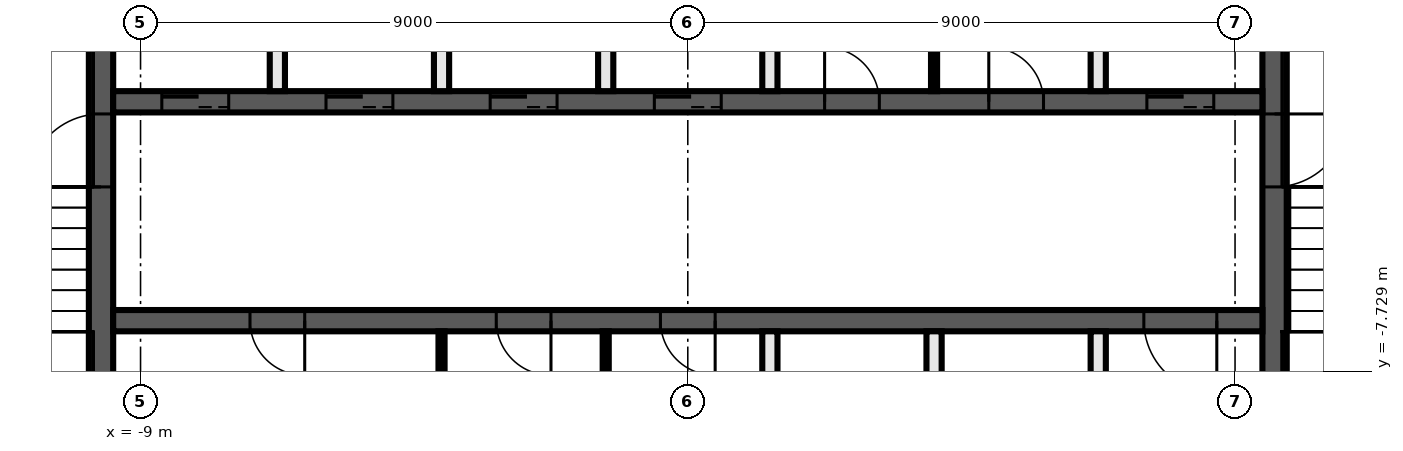
"""IFC4 building model, lengths in metres.
Left out: names, types, materials, properties, quantities, classifications, styles, units other than length and angle.
Written with IfcOpenShell. Run it as: python <this file> out.ifc"""

import sys

from ifc_helpers import new_model, si_unit, direction, frame, frame_2d, origin, place, context, subcontext, project, spatial, rectangle, extrude, element, fill, save


model = new_model("IFC4")
c1 = context("Model", 3, precision=1e-05, world=origin(), true_north=direction((0.0, 1.0)))
c2 = subcontext(c1, "Body", "Model", "MODEL_VIEW")
j1 = project(units=[si_unit("LENGTHUNIT", "METRE"), si_unit("PLANEANGLEUNIT", "RADIAN")], contexts=[c1])
p1 = place(None, origin())
s1 = spatial("IfcSite", under=j1, at=p1, CompositionType="ELEMENT")
p2 = place(p1, origin())
s2 = spatial("IfcBuilding", under=s1, at=p2, CompositionType="ELEMENT")
p3 = place(p2, frame((0.0, 0.0, 220.6)))
s3 = spatial("IfcBuildingStorey", under=s2, at=p3, CompositionType="ELEMENT", Elevation=220.6)
p4 = place(p3, frame((9.65, -2.3, 0.0), z_axis=(0.0, 0.0, 1.0), x_axis=(0.0, -1.0, 0.0)))
e1 = element("IfcWall", 1, at=p4, inside=s3, PredefinedType="SHEAR", context=c2, shape_type="SweptSolid", body=[
    extrude(rectangle(XDim=7.5, YDim=0.4, at=frame_2d((3.75, 0.0))), origin(), (0.0, 0.0, 1.0), 7.55),
])
p5 = place(p4, frame((1.2, 0.0, 0.0)))
e2 = element("IfcOpeningElement", 2, at=p5, cuts=e1, PredefinedType="OPENING", context=c2, shape_type="SweptSolid", body=[
    extrude(rectangle(XDim=1.2, YDim=2.1, at=frame_2d((0.6, 1.05))), frame((0.0, 0.21, 0.0), z_axis=(0.0, -1.0, 0.0), x_axis=(1.0, 0.0, 0.0)), (0.0, 0.0, 1.0), 0.42),
])
p6 = place(p3, frame((-9.65, -9.8, 0.0), z_axis=(0.0, 0.0, 1.0), x_axis=(0.0, 1.0, 0.0)))
e3 = element("IfcWall", 3, at=p6, inside=s3, PredefinedType="SHEAR", context=c2, shape_type="SweptSolid", body=[
    extrude(rectangle(XDim=7.5, YDim=0.4, at=frame_2d((3.75, 0.0))), origin(), (0.0, 0.0, 1.0), 7.55),
])
p7 = place(p6, frame((5.1, 0.0, 0.0)))
e4 = element("IfcOpeningElement", 4, at=p7, cuts=e3, PredefinedType="OPENING", context=c2, shape_type="SweptSolid", body=[
    extrude(rectangle(XDim=1.2, YDim=2.1, at=frame_2d((0.6, 1.05))), frame((0.0, 0.21, 0.0), z_axis=(0.0, -1.0, 0.0), x_axis=(1.0, 0.0, 0.0)), (0.0, 0.0, 1.0), 0.42),
])
p8 = place(p3, frame((-9.45, -3.3, 0.0), z_axis=(0.0, 0.0, 1.0), x_axis=(1.0, 0.0, 0.0)))
e5 = element("IfcWall", 5, at=p8, inside=s3, PredefinedType="SHEAR", context=c2, shape_type="SweptSolid", body=[
    extrude(rectangle(XDim=18.9, YDim=0.35, at=frame_2d((9.45, 0.0))), origin(), (0.0, 0.0, 1.0), 7.55),
])
p9 = place(p8, frame((0.8, 0.0, 0.0)))
e6 = element("IfcOpeningElement", 6, at=p9, cuts=e5, PredefinedType="OPENING", context=c2, shape_type="SweptSolid", body=[
    extrude(rectangle(XDim=1.1, YDim=2.1, at=frame_2d((0.55, 1.05))), frame((0.0, 0.185, 0.0), z_axis=(0.0, -1.0, 0.0), x_axis=(1.0, 0.0, 0.0)), (0.0, 0.0, 1.0), 0.37),
])
p10 = place(p8, frame((3.5, 0.0, 0.0)))
e7 = element("IfcOpeningElement", 7, at=p10, cuts=e5, PredefinedType="OPENING", context=c2, shape_type="SweptSolid", body=[
    extrude(rectangle(XDim=1.1, YDim=2.1, at=frame_2d((0.55, 1.05))), frame((0.0, 0.185, 0.0), z_axis=(0.0, -1.0, 0.0), x_axis=(1.0, 0.0, 0.0)), (0.0, 0.0, 1.0), 0.37),
])
p11 = place(p8, frame((6.2, 0.0, 0.0)))
e8 = element("IfcOpeningElement", 8, at=p11, cuts=e5, PredefinedType="OPENING", context=c2, shape_type="SweptSolid", body=[
    extrude(rectangle(XDim=1.1, YDim=2.1, at=frame_2d((0.55, 1.05))), frame((0.0, 0.185, 0.0), z_axis=(0.0, -1.0, 0.0), x_axis=(1.0, 0.0, 0.0)), (0.0, 0.0, 1.0), 0.37),
])
p12 = place(p8, frame((8.9, 0.0, 0.0)))
e9 = element("IfcOpeningElement", 9, at=p12, cuts=e5, PredefinedType="OPENING", context=c2, shape_type="SweptSolid", body=[
    extrude(rectangle(XDim=1.1, YDim=2.1, at=frame_2d((0.55, 1.05))), frame((0.0, 0.185, 0.0), z_axis=(0.0, -1.0, 0.0), x_axis=(1.0, 0.0, 0.0)), (0.0, 0.0, 1.0), 0.37),
])
p13 = place(p8, frame((17.0, 0.0, 0.0)))
e10 = element("IfcOpeningElement", 10, at=p13, cuts=e5, PredefinedType="OPENING", context=c2, shape_type="SweptSolid", body=[
    extrude(rectangle(XDim=1.1, YDim=2.1, at=frame_2d((0.55, 1.05))), frame((0.0, 0.185, 0.0), z_axis=(0.0, -1.0, 0.0), x_axis=(1.0, 0.0, 0.0)), (0.0, 0.0, 1.0), 0.37),
])
p14 = place(p8, frame((11.7, 0.0, 0.0)))
e11 = element("IfcOpeningElement", 11, at=p14, cuts=e5, PredefinedType="OPENING", context=c2, shape_type="SweptSolid", body=[
    extrude(rectangle(XDim=0.9, YDim=2.1, at=frame_2d((0.45, 1.05))), frame((0.0, 0.185, 0.0), z_axis=(0.0, -1.0, 0.0), x_axis=(1.0, 0.0, 0.0)), (0.0, 0.0, 1.0), 0.37),
])
p15 = place(p8, frame((14.4, 0.0, 0.0)))
e12 = element("IfcOpeningElement", 12, at=p15, cuts=e5, PredefinedType="OPENING", context=c2, shape_type="SweptSolid", body=[
    extrude(rectangle(XDim=0.9, YDim=2.1, at=frame_2d((0.45, 1.05))), frame((0.0, 0.185, 0.0), z_axis=(0.0, -1.0, 0.0), x_axis=(1.0, 0.0, 0.0)), (0.0, 0.0, 1.0), 0.37),
])
p16 = place(p3, frame((9.45, -6.9, 0.0), z_axis=(0.0, 0.0, 1.0), x_axis=(-1.0, 0.0, 0.0)))
e13 = element("IfcWall", 13, at=p16, inside=s3, PredefinedType="SHEAR", context=c2, shape_type="SweptSolid", body=[
    extrude(rectangle(XDim=18.9, YDim=0.35, at=frame_2d((9.45, 0.0))), origin(), (0.0, 0.0, 1.0), 7.55),
])
p17 = place(p16, frame((0.75, 0.0, 0.0)))
e14 = element("IfcOpeningElement", 14, at=p17, cuts=e13, PredefinedType="OPENING", context=c2, shape_type="SweptSolid", body=[
    extrude(rectangle(XDim=1.2, YDim=2.1, at=frame_2d((0.6, 1.05))), frame((0.0, 0.185, 0.0), z_axis=(0.0, -1.0, 0.0), x_axis=(1.0, 0.0, 0.0)), (0.0, 0.0, 1.0), 0.37),
])
p18 = place(p16, frame((15.75, 0.0, 0.0)))
e15 = element("IfcOpeningElement", 15, at=p18, cuts=e13, PredefinedType="OPENING", context=c2, shape_type="SweptSolid", body=[
    extrude(rectangle(XDim=0.9, YDim=2.1, at=frame_2d((0.45, 1.05))), frame((0.0, 0.185, 0.0), z_axis=(0.0, -1.0, 0.0), x_axis=(1.0, 0.0, 0.0)), (0.0, 0.0, 1.0), 0.37),
])
p19 = place(p16, frame((11.7, 0.0, 0.0)))
e16 = element("IfcOpeningElement", 16, at=p19, cuts=e13, PredefinedType="OPENING", context=c2, shape_type="SweptSolid", body=[
    extrude(rectangle(XDim=0.9, YDim=2.1, at=frame_2d((0.45, 1.05))), frame((0.0, 0.185, 0.0), z_axis=(0.0, -1.0, 0.0), x_axis=(1.0, 0.0, 0.0)), (0.0, 0.0, 1.0), 0.37),
])
p20 = place(p16, frame((9.0, 0.0, 0.0)))
e17 = element("IfcOpeningElement", 17, at=p20, cuts=e13, PredefinedType="OPENING", context=c2, shape_type="SweptSolid", body=[
    extrude(rectangle(XDim=0.9, YDim=2.1, at=frame_2d((0.45, 1.05))), frame((0.0, 0.185, 0.0), z_axis=(0.0, -1.0, 0.0), x_axis=(1.0, 0.0, 0.0)), (0.0, 0.0, 1.0), 0.37),
])
for number, where, z_axis, x_axis in (
    (18, (6.75, -9.8, 0.0), (0.0, 0.0, 1.0), (0.0, 1.0, 0.0)),
    (19, (6.75, -3.125, 0.0), (0.0, 0.0, 1.0), (0.0, 1.0, 0.0)),
):
    element("IfcWall", number, at=place(p3, frame(where, z_axis=z_axis, x_axis=x_axis)), inside=s3, PredefinedType="SOLIDWALL", context=c2, shape_type="SweptSolid", body=[
        extrude(rectangle(XDim=2.725, YDim=0.25, at=frame_2d((1.363, 0.0))), origin(), (0.0, 0.0, 1.0), 7.55),
    ])
p21 = place(p3, frame((4.05, -3.125, 0.0), z_axis=(0.0, 0.0, 1.0), x_axis=(0.0, 1.0, 0.0)))
e20 = element("IfcWall", 20, at=p21, inside=s3, PredefinedType="PARTITIONING", context=c2, shape_type="SweptSolid", body=[
    extrude(rectangle(XDim=2.725, YDim=0.1, at=frame_2d((1.363, 0.0))), origin(), (0.0, 0.0, 1.0), 7.55),
])
for number, where, z_axis, x_axis in (
    (21, (4.05, -9.8, 0.0), (0.0, 0.0, 1.0), (0.0, 1.0, 0.0)),
    (22, (1.35, -9.8, 0.0), (0.0, 0.0, 1.0), (0.0, 1.0, 0.0)),
    (23, (1.35, -3.125, 0.0), (0.0, 0.0, 1.0), (0.0, 1.0, 0.0)),
):
    element("IfcWall", number, at=place(p3, frame(where, z_axis=z_axis, x_axis=x_axis)), inside=s3, PredefinedType="SOLIDWALL", context=c2, shape_type="SweptSolid", body=[
        extrude(rectangle(XDim=2.725, YDim=0.25, at=frame_2d((1.363, 0.0))), origin(), (0.0, 0.0, 1.0), 7.55),
    ])
p22 = place(p3, frame((-1.35, -9.8, 0.0), z_axis=(0.0, 0.0, 1.0), x_axis=(0.0, 1.0, 0.0)))
e24 = element("IfcWall", 24, at=p22, inside=s3, PredefinedType="PARTITIONING", context=c2, shape_type="SweptSolid", body=[
    extrude(rectangle(XDim=2.725, YDim=0.1, at=frame_2d((1.363, 0.0))), origin(), (0.0, 0.0, 1.0), 7.55),
])
p23 = place(p3, frame((-1.35, -3.125, 0.0), z_axis=(0.0, 0.0, 1.0), x_axis=(0.0, 1.0, 0.0)))
e25 = element("IfcWall", 25, at=p23, inside=s3, PredefinedType="SOLIDWALL", context=c2, shape_type="SweptSolid", body=[
    extrude(rectangle(XDim=2.725, YDim=0.25, at=frame_2d((1.363, 0.0))), origin(), (0.0, 0.0, 1.0), 7.55),
])
p24 = place(p3, frame((-4.05, -9.8, 0.0), z_axis=(0.0, 0.0, 1.0), x_axis=(0.0, 1.0, 0.0)))
e26 = element("IfcWall", 26, at=p24, inside=s3, PredefinedType="PARTITIONING", context=c2, shape_type="SweptSolid", body=[
    extrude(rectangle(XDim=2.725, YDim=0.1, at=frame_2d((1.363, 0.0))), origin(), (0.0, 0.0, 1.0), 7.55),
])
for number, where, z_axis, x_axis in (
    (27, (-4.05, -3.125, 0.0), (0.0, 0.0, 1.0), (0.0, 1.0, 0.0)),
    (28, (-6.75, -3.125, 0.0), (0.0, 0.0, 1.0), (0.0, 1.0, 0.0)),
):
    element("IfcWall", number, at=place(p3, frame(where, z_axis=z_axis, x_axis=x_axis)), inside=s3, PredefinedType="SOLIDWALL", context=c2, shape_type="SweptSolid", body=[
        extrude(rectangle(XDim=2.725, YDim=0.25, at=frame_2d((1.363, 0.0))), origin(), (0.0, 0.0, 1.0), 7.55),
    ])
p25 = place(p9, origin())
e29 = element("IfcDoor", 29, at=p25, inside=s3, OperationType="DOUBLE_DOOR_SLIDING", PredefinedType="DOOR", context=c2, shape_type="SweptSolid", body=[
    extrude(rectangle(XDim=1.1, YDim=2.1, at=frame_2d((0.55, 1.05))), frame((0.0, 0.025, 0.0), z_axis=(0.0, -1.0, 0.0), x_axis=(1.0, 0.0, 0.0)), (0.0, 0.0, 1.0), 0.05),
])
fill(e6, e29)
p26 = place(p10, origin())
e30 = element("IfcDoor", 30, at=p26, inside=s3, OperationType="DOUBLE_DOOR_SLIDING", PredefinedType="DOOR", context=c2, shape_type="SweptSolid", body=[
    extrude(rectangle(XDim=1.1, YDim=2.1, at=frame_2d((0.55, 1.05))), frame((0.0, 0.025, 0.0), z_axis=(0.0, -1.0, 0.0), x_axis=(1.0, 0.0, 0.0)), (0.0, 0.0, 1.0), 0.05),
])
fill(e7, e30)
p27 = place(p11, origin())
e31 = element("IfcDoor", 31, at=p27, inside=s3, OperationType="DOUBLE_DOOR_SLIDING", PredefinedType="DOOR", context=c2, shape_type="SweptSolid", body=[
    extrude(rectangle(XDim=1.1, YDim=2.1, at=frame_2d((0.55, 1.05))), frame((0.0, 0.025, 0.0), z_axis=(0.0, -1.0, 0.0), x_axis=(1.0, 0.0, 0.0)), (0.0, 0.0, 1.0), 0.05),
])
fill(e8, e31)
p28 = place(p12, origin())
e32 = element("IfcDoor", 32, at=p28, inside=s3, OperationType="DOUBLE_DOOR_SLIDING", PredefinedType="DOOR", context=c2, shape_type="SweptSolid", body=[
    extrude(rectangle(XDim=1.1, YDim=2.1, at=frame_2d((0.55, 1.05))), frame((0.0, 0.025, 0.0), z_axis=(0.0, -1.0, 0.0), x_axis=(1.0, 0.0, 0.0)), (0.0, 0.0, 1.0), 0.05),
])
fill(e9, e32)
p29 = place(p13, origin())
e33 = element("IfcDoor", 33, at=p29, inside=s3, OperationType="DOUBLE_DOOR_SLIDING", PredefinedType="DOOR", context=c2, shape_type="SweptSolid", body=[
    extrude(rectangle(XDim=1.1, YDim=2.1, at=frame_2d((0.55, 1.05))), frame((0.0, 0.025, 0.0), z_axis=(0.0, -1.0, 0.0), x_axis=(1.0, 0.0, 0.0)), (0.0, 0.0, 1.0), 0.05),
])
fill(e10, e33)
p30 = place(p17, origin())
e34 = element("IfcDoor", 34, at=p30, inside=s3, OperationType="SINGLE_SWING_LEFT", PredefinedType="DOOR", context=c2, shape_type="SweptSolid", body=[
    extrude(rectangle(XDim=1.2, YDim=2.1, at=frame_2d((0.6, 1.05))), frame((0.0, 0.025, 0.0), z_axis=(0.0, -1.0, 0.0), x_axis=(1.0, 0.0, 0.0)), (0.0, 0.0, 1.0), 0.05),
])
fill(e14, e34)
p31 = place(p14, origin())
e35 = element("IfcDoor", 35, at=p31, inside=s3, OperationType="SINGLE_SWING_LEFT", PredefinedType="DOOR", context=c2, shape_type="SweptSolid", body=[
    extrude(rectangle(XDim=0.9, YDim=2.1, at=frame_2d((0.45, 1.05))), frame((0.0, 0.025, 0.0), z_axis=(0.0, -1.0, 0.0), x_axis=(1.0, 0.0, 0.0)), (0.0, 0.0, 1.0), 0.05),
])
fill(e11, e35)
p32 = place(p15, origin())
e36 = element("IfcDoor", 36, at=p32, inside=s3, OperationType="SINGLE_SWING_RIGHT", PredefinedType="DOOR", context=c2, shape_type="SweptSolid", body=[
    extrude(rectangle(XDim=0.9, YDim=2.1, at=frame_2d((0.45, 1.05))), frame((0.0, 0.025, 0.0), z_axis=(0.0, -1.0, 0.0), x_axis=(1.0, 0.0, 0.0)), (0.0, 0.0, 1.0), 0.05),
])
fill(e12, e36)
p33 = place(p18, origin())
e37 = element("IfcDoor", 37, at=p33, inside=s3, OperationType="SINGLE_SWING_LEFT", PredefinedType="DOOR", context=c2, shape_type="SweptSolid", body=[
    extrude(rectangle(XDim=0.9, YDim=2.1, at=frame_2d((0.45, 1.05))), frame((0.0, 0.025, 0.0), z_axis=(0.0, -1.0, 0.0), x_axis=(1.0, 0.0, 0.0)), (0.0, 0.0, 1.0), 0.05),
])
fill(e15, e37)
p34 = place(p19, origin())
e38 = element("IfcDoor", 38, at=p34, inside=s3, OperationType="SINGLE_SWING_RIGHT", PredefinedType="DOOR", context=c2, shape_type="SweptSolid", body=[
    extrude(rectangle(XDim=0.9, YDim=2.1, at=frame_2d((0.45, 1.05))), frame((0.0, 0.025, 0.0), z_axis=(0.0, -1.0, 0.0), x_axis=(1.0, 0.0, 0.0)), (0.0, 0.0, 1.0), 0.05),
])
fill(e16, e38)
p35 = place(p20, origin())
e39 = element("IfcDoor", 39, at=p35, inside=s3, OperationType="SINGLE_SWING_LEFT", PredefinedType="DOOR", context=c2, shape_type="SweptSolid", body=[
    extrude(rectangle(XDim=0.9, YDim=2.1, at=frame_2d((0.45, 1.05))), frame((0.0, 0.025, 0.0), z_axis=(0.0, -1.0, 0.0), x_axis=(1.0, 0.0, 0.0)), (0.0, 0.0, 1.0), 0.05),
])
fill(e17, e39)
p36 = place(p5, origin())
e40 = element("IfcDoor", 40, at=p36, inside=s3, OperationType="SINGLE_SWING_RIGHT", PredefinedType="DOOR", context=c2, shape_type="SweptSolid", body=[
    extrude(rectangle(XDim=1.2, YDim=2.1, at=frame_2d((0.6, 1.05))), frame((0.0, 0.025, 0.0), z_axis=(0.0, -1.0, 0.0), x_axis=(1.0, 0.0, 0.0)), (0.0, 0.0, 1.0), 0.05),
])
fill(e2, e40)
p37 = place(p7, origin())
e41 = element("IfcDoor", 41, at=p37, inside=s3, OperationType="SINGLE_SWING_LEFT", PredefinedType="DOOR", context=c2, shape_type="SweptSolid", body=[
    extrude(rectangle(XDim=1.2, YDim=2.1, at=frame_2d((0.6, 1.05))), frame((0.0, 0.025, 0.0), z_axis=(0.0, -1.0, 0.0), x_axis=(1.0, 0.0, 0.0)), (0.0, 0.0, 1.0), 0.05),
])
fill(e4, e41)
save(model, sys.argv[1])
